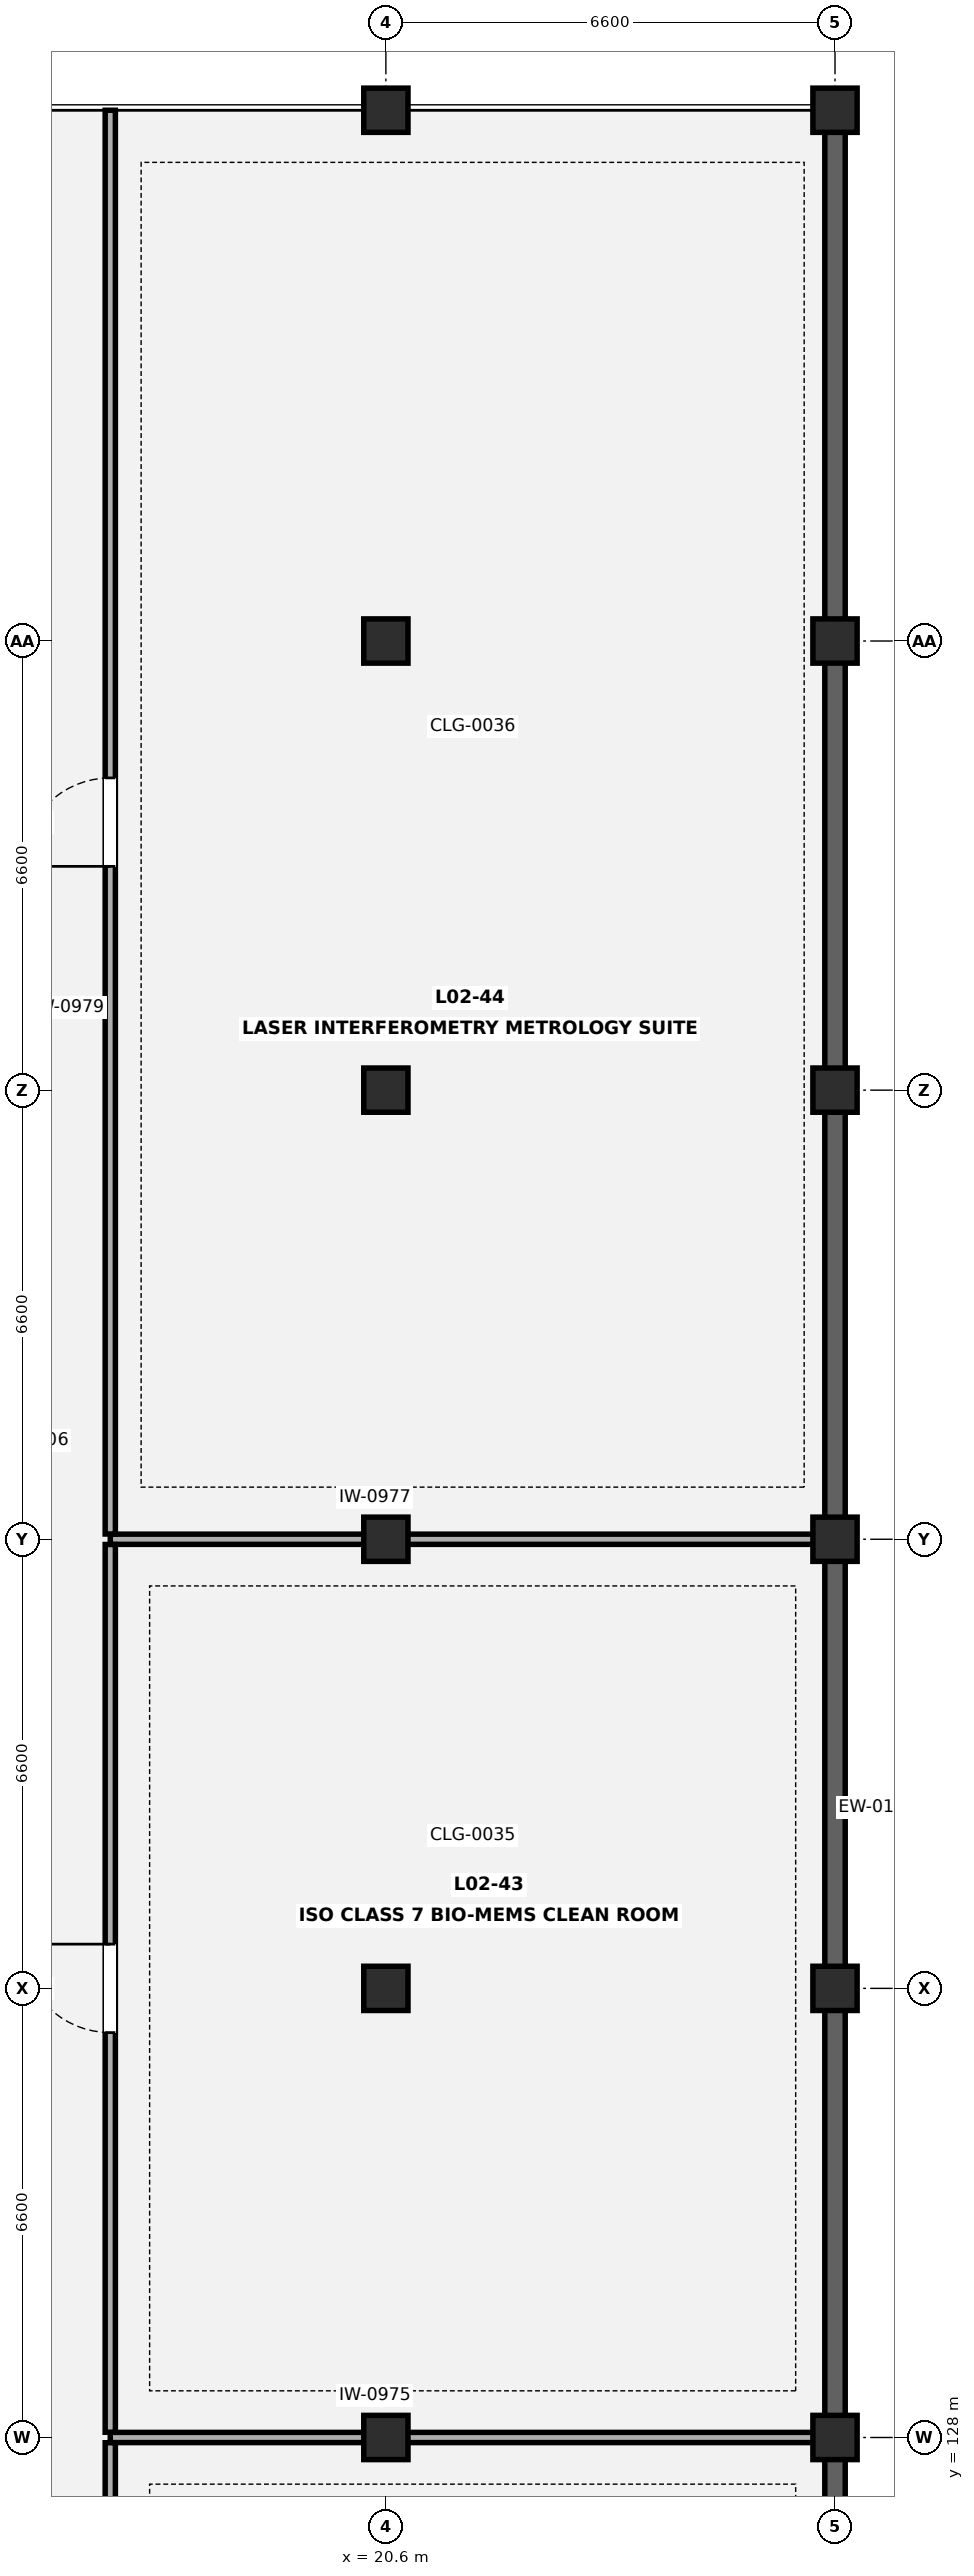
"""IFC4 building model, lengths in metres.
Left out: names, types, materials, properties, quantities, classifications, styles, units other than length and angle.
Written with IfcOpenShell. Run it as: python <this file> out.ifc"""

import sys

from ifc_helpers import new_model, si_unit, direction, frame, frame_2d, origin, origin_2d, place, context, subcontext, project, spatial, rectangle, extrude, element, fill, save


model = new_model("IFC4")
c1 = context("Model", 3, precision=1e-05, world=origin(), true_north=direction((0.0, 1.0)))
c2 = subcontext(c1, "Body", "Model", "MODEL_VIEW")
j1 = project(units=[si_unit("LENGTHUNIT", "METRE"), si_unit("PLANEANGLEUNIT", "RADIAN")], contexts=[c1])
p1 = place(None, origin())
s1 = spatial("IfcSite", under=j1, at=p1, CompositionType="ELEMENT")
p2 = place(p1, origin())
s2 = spatial("IfcBuilding", under=s1, at=p2, CompositionType="ELEMENT")
p3 = place(p2, frame((0.0, 0.0, 9.1)))
s3 = spatial("IfcBuildingStorey", under=s2, at=p3, CompositionType="ELEMENT", Elevation=9.1)
for number, where, z_axis, x_axis in (
    (1, (20.6, 128.0, 0.0), (0.0, 0.0, 1.0), (1.0, 0.0, 0.0)),
    (2, (20.6, 134.6, 0.0), (0.0, 0.0, 1.0), (1.0, 0.0, 0.0)),
    (3, (20.6, 141.2, 0.0), (0.0, 0.0, 1.0), (1.0, 0.0, 0.0)),
    (4, (20.6, 147.8, 0.0), (0.0, 0.0, 1.0), (1.0, 0.0, 0.0)),
    (5, (20.6, 154.4, 0.0), (0.0, 0.0, 1.0), (1.0, 0.0, 0.0)),
    (6, (20.6, 162.2, 0.0), (0.0, 0.0, 1.0), (1.0, 0.0, 0.0)),
    (7, (27.2, 128.0, 0.0), (0.0, 0.0, 1.0), (1.0, 0.0, 0.0)),
    (8, (27.2, 134.6, 0.0), (0.0, 0.0, 1.0), (1.0, 0.0, 0.0)),
    (9, (27.2, 141.2, 0.0), (0.0, 0.0, 1.0), (1.0, 0.0, 0.0)),
    (10, (27.2, 147.8, 0.0), (0.0, 0.0, 1.0), (1.0, 0.0, 0.0)),
    (11, (27.2, 154.4, 0.0), (0.0, 0.0, 1.0), (1.0, 0.0, 0.0)),
    (12, (27.2, 162.2, 0.0), (0.0, 0.0, 1.0), (1.0, 0.0, 0.0)),
):
    element("IfcColumn", number, at=place(p3, frame(where, z_axis=z_axis, x_axis=x_axis)), inside=s3, PredefinedType="COLUMN", context=c2, shape_type="SweptSolid", body=[
        extrude(rectangle(XDim=0.65, YDim=0.65, at=origin_2d()), origin(), (0.0, 0.0, 1.0), 4.2),
    ])
p4 = place(p3, frame((27.2, 161.877, 0.0), z_axis=(0.0, 0.0, 1.0), x_axis=(0.0, -1.0, 0.0)))
e13 = element("IfcWall", 13, at=p4, inside=s3, PredefinedType="SOLIDWALL", context=c2, shape_type="SweptSolid", body=[
    extrude(rectangle(XDim=66.554, YDim=0.3, at=frame_2d((33.277, 0.0))), origin(), (0.0, 0.0, 1.0), 3.84),
])
p5 = place(p3, frame((16.55, 128.0, 0.0), z_axis=(0.0, 0.0, 1.0), x_axis=(1.0, 0.0, 0.0)))
e14 = element("IfcWall", 14, at=p5, inside=s3, PredefinedType="PARTITIONING", context=c2, shape_type="SweptSolid", body=[
    extrude(rectangle(XDim=10.508, YDim=0.15, at=frame_2d((5.254, 0.0))), origin(), (0.0, 0.0, 1.0), 2.435),
])
p6 = place(p3, frame((16.55, 114.877, 0.0), z_axis=(0.0, 0.0, 1.0), x_axis=(0.0, 1.0, 0.0)))
e15 = element("IfcWall", 15, at=p6, inside=s3, PredefinedType="PARTITIONING", context=c2, shape_type="SweptSolid", body=[
    extrude(rectangle(XDim=13.046, YDim=0.15, at=frame_2d((6.523, 0.0))), origin(), (0.0, 0.0, 1.0), 3.85),
])
p7 = place(p6, frame((5.873, 0.0, 0.0)))
e16 = element("IfcOpeningElement", 16, at=p7, cuts=e15, PredefinedType="OPENING", context=c2, shape_type="SweptSolid", body=[
    extrude(rectangle(XDim=1.3, YDim=2.2, at=frame_2d((0.65, 1.1))), frame((0.0, 0.085, 0.0), z_axis=(0.0, -1.0, 0.0), x_axis=(1.0, 0.0, 0.0)), (0.0, 0.0, 1.0), 0.17),
])
p8 = place(p3, frame((16.55, 141.2, 0.0), z_axis=(0.0, 0.0, 1.0), x_axis=(1.0, 0.0, 0.0)))
e17 = element("IfcWall", 17, at=p8, inside=s3, PredefinedType="PARTITIONING", context=c2, shape_type="SweptSolid", body=[
    extrude(rectangle(XDim=10.508, YDim=0.15, at=frame_2d((5.254, 0.0))), origin(), (0.0, 0.0, 1.0), 2.435),
])
p9 = place(p3, frame((16.55, 128.077, 0.0), z_axis=(0.0, 0.0, 1.0), x_axis=(0.0, 1.0, 0.0)))
e18 = element("IfcWall", 18, at=p9, inside=s3, PredefinedType="PARTITIONING", context=c2, shape_type="SweptSolid", body=[
    extrude(rectangle(XDim=13.046, YDim=0.15, at=frame_2d((6.523, 0.0))), origin(), (0.0, 0.0, 1.0), 3.85),
])
p10 = place(p9, frame((5.873, 0.0, 0.0)))
e19 = element("IfcOpeningElement", 19, at=p10, cuts=e18, PredefinedType="OPENING", context=c2, shape_type="SweptSolid", body=[
    extrude(rectangle(XDim=1.3, YDim=2.2, at=frame_2d((0.65, 1.1))), frame((0.0, 0.085, 0.0), z_axis=(0.0, -1.0, 0.0), x_axis=(1.0, 0.0, 0.0)), (0.0, 0.0, 1.0), 0.17),
])
p11 = place(p3, frame((16.55, 141.277, 0.0), z_axis=(0.0, 0.0, 1.0), x_axis=(0.0, 1.0, 0.0)))
e20 = element("IfcWall", 20, at=p11, inside=s3, PredefinedType="PARTITIONING", context=c2, shape_type="SweptSolid", body=[
    extrude(rectangle(XDim=20.923, YDim=0.15, at=frame_2d((10.461, 0.0))), origin(), (0.0, 0.0, 1.0), 3.85),
])
p12 = place(p11, frame((9.812, 0.0, 0.0)))
e21 = element("IfcOpeningElement", 21, at=p12, cuts=e20, PredefinedType="OPENING", context=c2, shape_type="SweptSolid", body=[
    extrude(rectangle(XDim=1.3, YDim=2.2, at=frame_2d((0.65, 1.1))), frame((0.0, 0.085, 0.0), z_axis=(0.0, -1.0, 0.0), x_axis=(1.0, 0.0, 0.0)), (0.0, 0.0, 1.0), 0.17),
])
p13 = place(p10, origin())
e22 = element("IfcDoor", 22, at=p13, inside=s3, OperationType="SINGLE_SWING_RIGHT", PredefinedType="DOOR", context=c2, shape_type="SweptSolid", body=[
    extrude(rectangle(XDim=1.3, YDim=2.2, at=frame_2d((0.65, 1.1))), frame((0.0, 0.025, 0.0), z_axis=(0.0, -1.0, 0.0), x_axis=(1.0, 0.0, 0.0)), (0.0, 0.0, 1.0), 0.05),
])
fill(e19, e22)
p14 = place(p12, origin())
e23 = element("IfcDoor", 23, at=p14, inside=s3, OperationType="SINGLE_SWING_LEFT", PredefinedType="DOOR", context=c2, shape_type="SweptSolid", body=[
    extrude(rectangle(XDim=1.3, YDim=2.2, at=frame_2d((0.65, 1.1))), frame((0.0, 0.025, 0.0), z_axis=(0.0, -1.0, 0.0), x_axis=(1.0, 0.0, 0.0)), (0.0, 0.0, 1.0), 0.05),
])
fill(e21, e23)
save(model, sys.argv[1])
